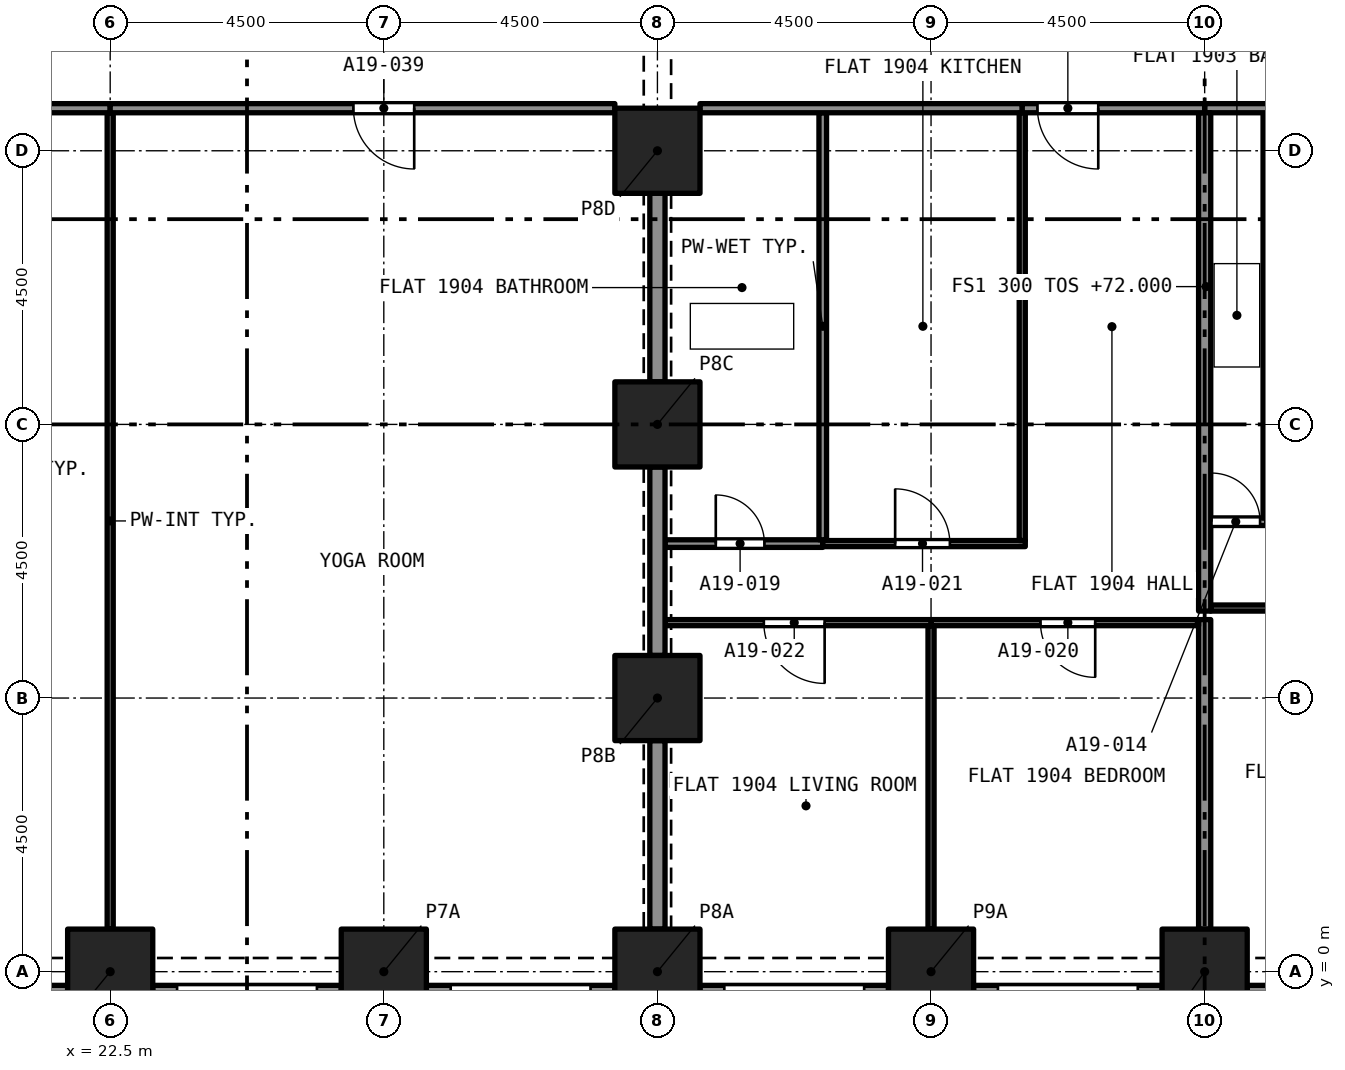
"""IFC4 building model, lengths in metres.
Left out: names, types, materials, properties, quantities, classifications, styles, units other than length and angle.
Written with IfcOpenShell. Run it as: python <this file> out.ifc"""

import sys

from ifc_helpers import new_model, si_unit, direction, frame, frame_2d, origin, origin_2d, place, context, subcontext, project, spatial, rectangle, extrude, element, fill, save


model = new_model("IFC4")
c1 = context("Model", 3, precision=1e-05, world=origin(), true_north=direction((0.0, 1.0)))
c2 = subcontext(c1, "Body", "Model", "MODEL_VIEW")
j1 = project(units=[si_unit("LENGTHUNIT", "METRE"), si_unit("PLANEANGLEUNIT", "RADIAN")], contexts=[c1])
p1 = place(None, origin())
s1 = spatial("IfcSite", under=j1, at=p1, CompositionType="ELEMENT")
p2 = place(p1, origin())
s2 = spatial("IfcBuilding", under=s1, at=p2, CompositionType="ELEMENT")
p3 = place(p2, frame((0.0, 0.0, 72.0)))
s3 = spatial("IfcBuildingStorey", under=s2, at=p3, CompositionType="ELEMENT", Elevation=72.0)
for number, where, z_axis, x_axis in (
    (1, (22.5, 0.0, 0.0), (0.0, 0.0, 1.0), (1.0, 0.0, 0.0)),
    (2, (27.0, 0.0, 0.0), (0.0, 0.0, 1.0), (1.0, 0.0, 0.0)),
    (3, (31.5, 0.0, 0.0), (0.0, 0.0, 1.0), (1.0, 0.0, 0.0)),
    (4, (36.0, 0.0, 0.0), (0.0, 0.0, 1.0), (1.0, 0.0, 0.0)),
    (5, (40.5, 0.0, 0.0), (0.0, 0.0, 1.0), (1.0, 0.0, 0.0)),
    (6, (31.5, 4.5, 0.0), (0.0, 0.0, 1.0), (1.0, 0.0, 0.0)),
    (7, (31.5, 9.0, 0.0), (0.0, 0.0, 1.0), (1.0, 0.0, 0.0)),
    (8, (31.5, 13.5, 0.0), (0.0, 0.0, 1.0), (1.0, 0.0, 0.0)),
):
    element("IfcColumn", number, at=place(p3, frame(where, z_axis=z_axis, x_axis=x_axis)), inside=s3, PredefinedType="COLUMN", context=c2, shape_type="SweptSolid", body=[
        extrude(rectangle(XDim=1.4, YDim=1.4, at=origin_2d()), origin(), (0.0, 0.0, 1.0), 3.2),
    ])
p4 = place(p3, frame((21.8, -0.375, 0.0), z_axis=(0.0, 0.0, 1.0), x_axis=(-1.0, 0.0, 0.0)))
e9 = element("IfcWall", 9, at=p4, inside=s3, PredefinedType="SOLIDWALL", context=c2, shape_type="SweptSolid", body=[
    extrude(rectangle(XDim=3.1, YDim=0.3, at=frame_2d((1.55, 0.0))), origin(), (0.0, 0.0, 1.0), 3.2),
])
p5 = place(p4, frame((0.4, 0.0, 0.45)))
e10 = element("IfcOpeningElement", 10, at=p5, cuts=e9, PredefinedType="OPENING", context=c2, shape_type="SweptSolid", body=[
    extrude(rectangle(XDim=2.3, YDim=1.95, at=frame_2d((1.15, 0.975))), frame((0.0, 0.16, 0.0), z_axis=(0.0, -1.0, 0.0), x_axis=(1.0, 0.0, 0.0)), (0.0, 0.0, 1.0), 0.32),
])
p6 = place(p3, frame((26.3, -0.375, 0.0), z_axis=(0.0, 0.0, 1.0), x_axis=(-1.0, 0.0, 0.0)))
e11 = element("IfcWall", 11, at=p6, inside=s3, PredefinedType="SOLIDWALL", context=c2, shape_type="SweptSolid", body=[
    extrude(rectangle(XDim=3.1, YDim=0.3, at=frame_2d((1.55, 0.0))), origin(), (0.0, 0.0, 1.0), 3.2),
])
p7 = place(p6, frame((0.4, 0.0, 0.45)))
e12 = element("IfcOpeningElement", 12, at=p7, cuts=e11, PredefinedType="OPENING", context=c2, shape_type="SweptSolid", body=[
    extrude(rectangle(XDim=2.3, YDim=1.95, at=frame_2d((1.15, 0.975))), frame((0.0, 0.16, 0.0), z_axis=(0.0, -1.0, 0.0), x_axis=(1.0, 0.0, 0.0)), (0.0, 0.0, 1.0), 0.32),
])
p8 = place(p3, frame((30.8, -0.375, 0.0), z_axis=(0.0, 0.0, 1.0), x_axis=(-1.0, 0.0, 0.0)))
e13 = element("IfcWall", 13, at=p8, inside=s3, PredefinedType="SOLIDWALL", context=c2, shape_type="SweptSolid", body=[
    extrude(rectangle(XDim=3.1, YDim=0.3, at=frame_2d((1.55, 0.0))), origin(), (0.0, 0.0, 1.0), 3.2),
])
p9 = place(p8, frame((0.4, 0.0, 0.45)))
e14 = element("IfcOpeningElement", 14, at=p9, cuts=e13, PredefinedType="OPENING", context=c2, shape_type="SweptSolid", body=[
    extrude(rectangle(XDim=2.3, YDim=1.95, at=frame_2d((1.15, 0.975))), frame((0.0, 0.16, 0.0), z_axis=(0.0, -1.0, 0.0), x_axis=(1.0, 0.0, 0.0)), (0.0, 0.0, 1.0), 0.32),
])
p10 = place(p3, frame((35.3, -0.375, 0.0), z_axis=(0.0, 0.0, 1.0), x_axis=(-1.0, 0.0, 0.0)))
e15 = element("IfcWall", 15, at=p10, inside=s3, PredefinedType="SOLIDWALL", context=c2, shape_type="SweptSolid", body=[
    extrude(rectangle(XDim=3.1, YDim=0.3, at=frame_2d((1.55, 0.0))), origin(), (0.0, 0.0, 1.0), 3.2),
])
p11 = place(p10, frame((0.4, 0.0, 0.45)))
e16 = element("IfcOpeningElement", 16, at=p11, cuts=e15, PredefinedType="OPENING", context=c2, shape_type="SweptSolid", body=[
    extrude(rectangle(XDim=2.3, YDim=1.95, at=frame_2d((1.15, 0.975))), frame((0.0, 0.16, 0.0), z_axis=(0.0, -1.0, 0.0), x_axis=(1.0, 0.0, 0.0)), (0.0, 0.0, 1.0), 0.32),
])
p12 = place(p3, frame((39.8, -0.375, 0.0), z_axis=(0.0, 0.0, 1.0), x_axis=(-1.0, 0.0, 0.0)))
e17 = element("IfcWall", 17, at=p12, inside=s3, PredefinedType="SOLIDWALL", context=c2, shape_type="SweptSolid", body=[
    extrude(rectangle(XDim=3.1, YDim=0.3, at=frame_2d((1.55, 0.0))), origin(), (0.0, 0.0, 1.0), 3.2),
])
p13 = place(p12, frame((0.4, 0.0, 0.45)))
e18 = element("IfcOpeningElement", 18, at=p13, cuts=e17, PredefinedType="OPENING", context=c2, shape_type="SweptSolid", body=[
    extrude(rectangle(XDim=2.3, YDim=1.95, at=frame_2d((1.15, 0.975))), frame((0.0, 0.16, 0.0), z_axis=(0.0, -1.0, 0.0), x_axis=(1.0, 0.0, 0.0)), (0.0, 0.0, 1.0), 0.32),
])
p14 = place(p3, frame((44.3, -0.375, 0.0), z_axis=(0.0, 0.0, 1.0), x_axis=(-1.0, 0.0, 0.0)))
e19 = element("IfcWall", 19, at=p14, inside=s3, PredefinedType="SOLIDWALL", context=c2, shape_type="SweptSolid", body=[
    extrude(rectangle(XDim=3.1, YDim=0.3, at=frame_2d((1.55, 0.0))), origin(), (0.0, 0.0, 1.0), 3.2),
])
p15 = place(p14, frame((0.4, 0.0, 0.45)))
e20 = element("IfcOpeningElement", 20, at=p15, cuts=e19, PredefinedType="OPENING", context=c2, shape_type="SweptSolid", body=[
    extrude(rectangle(XDim=2.3, YDim=1.95, at=frame_2d((1.15, 0.975))), frame((0.0, 0.16, 0.0), z_axis=(0.0, -1.0, 0.0), x_axis=(1.0, 0.0, 0.0)), (0.0, 0.0, 1.0), 0.32),
])
p16 = place(p3, frame((40.6, 7.4, 0.0), z_axis=(0.0, 0.0, 1.0), x_axis=(1.0, 0.0, 0.0)))
e21 = element("IfcWall", 21, at=p16, inside=s3, PredefinedType="PARTITIONING", context=c2, shape_type="SweptSolid", body=[
    extrude(rectangle(XDim=0.923, YDim=0.125, at=frame_2d((0.461, 0.0))), origin(), (0.0, 0.0, 1.0), 2.7),
])
p17 = place(p16, frame((0.011, 0.0, 0.0)))
e22 = element("IfcOpeningElement", 22, at=p17, cuts=e21, PredefinedType="OPENING", context=c2, shape_type="SweptSolid", body=[
    extrude(rectangle(XDim=0.8, YDim=2.1, at=frame_2d((0.4, 1.05))), frame((0.0, 0.073, 0.0), z_axis=(0.0, -1.0, 0.0), x_axis=(1.0, 0.0, 0.0)), (0.0, 0.0, 1.0), 0.145),
])
p18 = place(p3, frame((41.523, 7.462, 0.0), z_axis=(0.0, 0.0, 1.0), x_axis=(0.0, 1.0, 0.0)))
e23 = element("IfcWall", 23, at=p18, inside=s3, PredefinedType="PARTITIONING", context=c2, shape_type="SweptSolid", body=[
    extrude(rectangle(XDim=6.663, YDim=0.125, at=frame_2d((3.331, 0.0))), origin(), (0.0, 0.0, 1.0), 2.7),
])
p19 = place(p3, frame((40.5, 14.2, 0.0), z_axis=(0.0, 0.0, 1.0), x_axis=(1.0, 0.0, 0.0)))
e24 = element("IfcWall", 24, at=p19, inside=s3, PredefinedType="PARTITIONING", context=c2, shape_type="SweptSolid", body=[
    extrude(rectangle(XDim=2.25, YDim=0.15, at=frame_2d((1.125, 0.0))), origin(), (0.0, 0.0, 1.0), 2.7),
])
p20 = place(p3, frame((44.95, 5.98, 0.0), z_axis=(0.0, 0.0, 1.0), x_axis=(-1.0, 0.0, 0.0)))
e25 = element("IfcWall", 25, at=p20, inside=s3, PredefinedType="PARTITIONING", context=c2, shape_type="SweptSolid", body=[
    extrude(rectangle(XDim=4.35, YDim=0.1, at=frame_2d((2.175, 0.0))), origin(), (0.0, 0.0, 1.0), 2.7),
])
p21 = place(p20, frame((1.75, 0.0, 0.0)))
e26 = element("IfcOpeningElement", 26, at=p21, cuts=e25, PredefinedType="OPENING", context=c2, shape_type="SweptSolid", body=[
    extrude(rectangle(XDim=0.9, YDim=2.1, at=frame_2d((0.45, 1.05))), frame((0.0, 0.06, 0.0), z_axis=(0.0, -1.0, 0.0), x_axis=(1.0, 0.0, 0.0)), (0.0, 0.0, 1.0), 0.12),
])
p22 = place(p3, frame((40.5, 0.7, 0.0), z_axis=(0.0, 0.0, 1.0), x_axis=(0.0, 1.0, 0.0)))
e27 = element("IfcWall", 27, at=p22, inside=s3, PredefinedType="PARTITIONING", context=c2, shape_type="SweptSolid", body=[
    extrude(rectangle(XDim=5.09, YDim=0.2, at=frame_2d((2.545, 0.0))), origin(), (0.0, 0.0, 1.0), 2.7),
])
p23 = place(p3, frame((40.5, 5.93, 0.0), z_axis=(0.0, 0.0, 1.0), x_axis=(0.0, 1.0, 0.0)))
e28 = element("IfcWall", 28, at=p23, inside=s3, PredefinedType="PARTITIONING", context=c2, shape_type="SweptSolid", body=[
    extrude(rectangle(XDim=8.195, YDim=0.2, at=frame_2d((4.098, 0.0))), origin(), (0.0, 0.0, 1.0), 2.7),
])
p24 = place(p3, frame((31.625, 7.04, 0.0), z_axis=(0.0, 0.0, 1.0), x_axis=(1.0, 0.0, 0.0)))
e29 = element("IfcWall", 29, at=p24, inside=s3, PredefinedType="PARTITIONING", context=c2, shape_type="SweptSolid", body=[
    extrude(rectangle(XDim=2.594, YDim=0.125, at=frame_2d((1.297, 0.0))), origin(), (0.0, 0.0, 1.0), 2.7),
])
p25 = place(p24, frame((0.835, 0.0, 0.0)))
e30 = element("IfcOpeningElement", 30, at=p25, cuts=e29, PredefinedType="OPENING", context=c2, shape_type="SweptSolid", body=[
    extrude(rectangle(XDim=0.8, YDim=2.1, at=frame_2d((0.4, 1.05))), frame((0.0, 0.073, 0.0), z_axis=(0.0, -1.0, 0.0), x_axis=(1.0, 0.0, 0.0)), (0.0, 0.0, 1.0), 0.145),
])
p26 = place(p3, frame((34.219, 7.103, 0.0), z_axis=(0.0, 0.0, 1.0), x_axis=(0.0, 1.0, 0.0)))
e31 = element("IfcWall", 31, at=p26, inside=s3, PredefinedType="PARTITIONING", context=c2, shape_type="SweptSolid", body=[
    extrude(rectangle(XDim=7.022, YDim=0.125, at=frame_2d((3.511, 0.0))), origin(), (0.0, 0.0, 1.0), 2.7),
])
p27 = place(p3, frame((31.5, 9.7, 0.0), z_axis=(0.0, 0.0, 1.0), x_axis=(0.0, 1.0, 0.0)))
e32 = element("IfcWall", 32, at=p27, inside=s3, PredefinedType="PARTITIONING", context=c2, shape_type="SweptSolid", body=[
    extrude(rectangle(XDim=3.1, YDim=0.25, at=frame_2d((1.55, 0.0))), origin(), (0.0, 0.0, 1.0), 2.38),
])
p28 = place(p3, frame((32.2, 14.2, 0.0), z_axis=(0.0, 0.0, 1.0), x_axis=(1.0, 0.0, 0.0)))
e33 = element("IfcWall", 33, at=p28, inside=s3, PredefinedType="PARTITIONING", context=c2, shape_type="SweptSolid", body=[
    extrude(rectangle(XDim=5.3, YDim=0.15, at=frame_2d((2.65, 0.0))), origin(), (0.0, 0.0, 1.0), 2.7),
])
p29 = place(p3, frame((40.4, 5.74, 0.0), z_axis=(0.0, 0.0, 1.0), x_axis=(-1.0, 0.0, 0.0)))
e34 = element("IfcWall", 34, at=p29, inside=s3, PredefinedType="PARTITIONING", context=c2, shape_type="SweptSolid", body=[
    extrude(rectangle(XDim=4.4, YDim=0.1, at=frame_2d((2.2, 0.0))), origin(), (0.0, 0.0, 1.0), 2.7),
])
p30 = place(p29, frame((1.7, 0.0, 0.0)))
e35 = element("IfcOpeningElement", 35, at=p30, cuts=e34, PredefinedType="OPENING", context=c2, shape_type="SweptSolid", body=[
    extrude(rectangle(XDim=0.9, YDim=2.1, at=frame_2d((0.45, 1.05))), frame((0.0, 0.06, 0.0), z_axis=(0.0, -1.0, 0.0), x_axis=(1.0, 0.0, 0.0)), (0.0, 0.0, 1.0), 0.12),
])
p31 = place(p3, frame((36.0, 0.7, 0.0), z_axis=(0.0, 0.0, 1.0), x_axis=(0.0, 1.0, 0.0)))
e36 = element("IfcWall", 36, at=p31, inside=s3, PredefinedType="PARTITIONING", context=c2, shape_type="SweptSolid", body=[
    extrude(rectangle(XDim=4.99, YDim=0.1, at=frame_2d((2.495, 0.0))), origin(), (0.0, 0.0, 1.0), 2.7),
])
p32 = place(p3, frame((34.219, 7.04, 0.0), z_axis=(0.0, 0.0, 1.0), x_axis=(1.0, 0.0, 0.0)))
e37 = element("IfcWall", 37, at=p32, inside=s3, PredefinedType="PARTITIONING", context=c2, shape_type="SweptSolid", body=[
    extrude(rectangle(XDim=3.331, YDim=0.1, at=frame_2d((1.666, 0.0))), origin(), (0.0, 0.0, 1.0), 2.7),
])
p33 = place(p32, frame((1.19, 0.0, 0.0)))
e38 = element("IfcOpeningElement", 38, at=p33, cuts=e37, PredefinedType="OPENING", context=c2, shape_type="SweptSolid", body=[
    extrude(rectangle(XDim=0.9, YDim=2.1, at=frame_2d((0.45, 1.05))), frame((0.0, 0.06, 0.0), z_axis=(0.0, -1.0, 0.0), x_axis=(1.0, 0.0, 0.0)), (0.0, 0.0, 1.0), 0.12),
])
p34 = place(p3, frame((37.5, 7.09, 0.0), z_axis=(0.0, 0.0, 1.0), x_axis=(0.0, 1.0, 0.0)))
e39 = element("IfcWall", 39, at=p34, inside=s3, PredefinedType="PARTITIONING", context=c2, shape_type="SweptSolid", body=[
    extrude(rectangle(XDim=7.035, YDim=0.1, at=frame_2d((3.518, 0.0))), origin(), (0.0, 0.0, 1.0), 2.7),
])
p35 = place(p3, frame((36.0, 5.74, 0.0), z_axis=(0.0, 0.0, 1.0), x_axis=(-1.0, 0.0, 0.0)))
e40 = element("IfcWall", 40, at=p35, inside=s3, PredefinedType="PARTITIONING", context=c2, shape_type="SweptSolid", body=[
    extrude(rectangle(XDim=4.375, YDim=0.1, at=frame_2d((2.188, 0.0))), origin(), (0.0, 0.0, 1.0), 2.7),
])
p36 = place(p35, frame((1.75, 0.0, 0.0)))
e41 = element("IfcOpeningElement", 41, at=p36, cuts=e40, PredefinedType="OPENING", context=c2, shape_type="SweptSolid", body=[
    extrude(rectangle(XDim=1.0, YDim=2.1, at=frame_2d((0.5, 1.05))), frame((0.0, 0.06, 0.0), z_axis=(0.0, -1.0, 0.0), x_axis=(1.0, 0.0, 0.0)), (0.0, 0.0, 1.0), 0.12),
])
p37 = place(p3, frame((40.5, 14.2, 0.0), z_axis=(0.0, 0.0, 1.0), x_axis=(-1.0, 0.0, 0.0)))
e42 = element("IfcWall", 42, at=p37, inside=s3, PredefinedType="PARTITIONING", context=c2, shape_type="SweptSolid", body=[
    extrude(rectangle(XDim=3.0, YDim=0.15, at=frame_2d((1.5, 0.0))), origin(), (0.0, 0.0, 1.0), 2.7),
])
p38 = place(p37, frame((1.75, 0.0, 0.0)))
e43 = element("IfcOpeningElement", 43, at=p38, cuts=e42, PredefinedType="OPENING", context=c2, shape_type="SweptSolid", body=[
    extrude(rectangle(XDim=1.0, YDim=2.1, at=frame_2d((0.5, 1.05))), frame((0.0, 0.085, 0.0), z_axis=(0.0, -1.0, 0.0), x_axis=(1.0, 0.0, 0.0)), (0.0, 0.0, 1.0), 0.17),
])
for number, where, z_axis, x_axis in (
    (44, (31.5, 0.7, 0.0), (0.0, 0.0, 1.0), (0.0, 1.0, 0.0)),
    (45, (31.5, 5.2, 0.0), (0.0, 0.0, 1.0), (0.0, 1.0, 0.0)),
):
    element("IfcWall", number, at=place(p3, frame(where, z_axis=z_axis, x_axis=x_axis)), inside=s3, PredefinedType="PARTITIONING", context=c2, shape_type="SweptSolid", body=[
        extrude(rectangle(XDim=3.1, YDim=0.25, at=frame_2d((1.55, 0.0))), origin(), (0.0, 0.0, 1.0), 2.38),
    ])
p39 = place(p3, frame((22.5, 0.7, 0.0), z_axis=(0.0, 0.0, 1.0), x_axis=(0.0, 1.0, 0.0)))
e46 = element("IfcWall", 46, at=p39, inside=s3, PredefinedType="PARTITIONING", context=c2, shape_type="SweptSolid", body=[
    extrude(rectangle(XDim=13.425, YDim=0.1, at=frame_2d((6.712, 0.0))), origin(), (0.0, 0.0, 1.0), 2.7),
])
p40 = place(p3, frame((22.5, 14.2, 0.0), z_axis=(0.0, 0.0, 1.0), x_axis=(-1.0, 0.0, 0.0)))
e47 = element("IfcWall", 47, at=p40, inside=s3, PredefinedType="PARTITIONING", context=c2, shape_type="SweptSolid", body=[
    extrude(rectangle(XDim=3.8, YDim=0.15, at=frame_2d((1.9, 0.0))), origin(), (0.0, 0.0, 1.0), 2.7),
])
p41 = place(p40, frame((1.75, 0.0, 0.0)))
e48 = element("IfcOpeningElement", 48, at=p41, cuts=e47, PredefinedType="OPENING", context=c2, shape_type="SweptSolid", body=[
    extrude(rectangle(XDim=1.0, YDim=2.1, at=frame_2d((0.5, 1.05))), frame((0.0, 0.085, 0.0), z_axis=(0.0, -1.0, 0.0), x_axis=(1.0, 0.0, 0.0)), (0.0, 0.0, 1.0), 0.17),
])
p42 = place(p3, frame((30.8, 14.2, 0.0), z_axis=(0.0, 0.0, 1.0), x_axis=(-1.0, 0.0, 0.0)))
e49 = element("IfcWall", 49, at=p42, inside=s3, PredefinedType="PARTITIONING", context=c2, shape_type="SweptSolid", body=[
    extrude(rectangle(XDim=8.3, YDim=0.15, at=frame_2d((4.15, 0.0))), origin(), (0.0, 0.0, 1.0), 2.7),
])
p43 = place(p42, frame((3.3, 0.0, 0.0)))
e50 = element("IfcOpeningElement", 50, at=p43, cuts=e49, PredefinedType="OPENING", context=c2, shape_type="SweptSolid", body=[
    extrude(rectangle(XDim=1.0, YDim=2.1, at=frame_2d((0.5, 1.05))), frame((0.0, 0.085, 0.0), z_axis=(0.0, -1.0, 0.0), x_axis=(1.0, 0.0, 0.0)), (0.0, 0.0, 1.0), 0.17),
])
p44 = place(p17, origin())
e51 = element("IfcDoor", 51, at=p44, inside=s3, OperationType="SINGLE_SWING_LEFT", PredefinedType="DOOR", context=c2, shape_type="SweptSolid", body=[
    extrude(rectangle(XDim=0.8, YDim=2.1, at=frame_2d((0.4, 1.05))), frame((0.0, 0.025, 0.0), z_axis=(0.0, -1.0, 0.0), x_axis=(1.0, 0.0, 0.0)), (0.0, 0.0, 1.0), 0.05),
])
fill(e22, e51)
p45 = place(p25, origin())
e52 = element("IfcDoor", 52, at=p45, inside=s3, OperationType="SINGLE_SWING_LEFT", PredefinedType="DOOR", context=c2, shape_type="SweptSolid", body=[
    extrude(rectangle(XDim=0.8, YDim=2.1, at=frame_2d((0.4, 1.05))), frame((0.0, 0.025, 0.0), z_axis=(0.0, -1.0, 0.0), x_axis=(1.0, 0.0, 0.0)), (0.0, 0.0, 1.0), 0.05),
])
fill(e30, e52)
p46 = place(p30, origin())
e53 = element("IfcDoor", 53, at=p46, inside=s3, OperationType="SINGLE_SWING_LEFT", PredefinedType="DOOR", context=c2, shape_type="SweptSolid", body=[
    extrude(rectangle(XDim=0.9, YDim=2.1, at=frame_2d((0.45, 1.05))), frame((0.0, 0.025, 0.0), z_axis=(0.0, -1.0, 0.0), x_axis=(1.0, 0.0, 0.0)), (0.0, 0.0, 1.0), 0.05),
])
fill(e35, e53)
p47 = place(p33, origin())
e54 = element("IfcDoor", 54, at=p47, inside=s3, OperationType="SINGLE_SWING_LEFT", PredefinedType="DOOR", context=c2, shape_type="SweptSolid", body=[
    extrude(rectangle(XDim=0.9, YDim=2.1, at=frame_2d((0.45, 1.05))), frame((0.0, 0.025, 0.0), z_axis=(0.0, -1.0, 0.0), x_axis=(1.0, 0.0, 0.0)), (0.0, 0.0, 1.0), 0.05),
])
fill(e38, e54)
p48 = place(p36, origin())
e55 = element("IfcDoor", 55, at=p48, inside=s3, OperationType="SINGLE_SWING_RIGHT", PredefinedType="DOOR", context=c2, shape_type="SweptSolid", body=[
    extrude(rectangle(XDim=1.0, YDim=2.1, at=frame_2d((0.5, 1.05))), frame((0.0, 0.025, 0.0), z_axis=(0.0, -1.0, 0.0), x_axis=(1.0, 0.0, 0.0)), (0.0, 0.0, 1.0), 0.05),
])
fill(e41, e55)
p49 = place(p38, origin())
e56 = element("IfcDoor", 56, at=p49, inside=s3, OperationType="SINGLE_SWING_RIGHT", PredefinedType="DOOR", context=c2, shape_type="SweptSolid", body=[
    extrude(rectangle(XDim=1.0, YDim=2.1, at=frame_2d((0.5, 1.05))), frame((0.0, 0.025, 0.0), z_axis=(0.0, -1.0, 0.0), x_axis=(1.0, 0.0, 0.0)), (0.0, 0.0, 1.0), 0.05),
])
fill(e43, e56)
p50 = place(p43, origin())
e57 = element("IfcDoor", 57, at=p50, inside=s3, OperationType="SINGLE_SWING_LEFT", PredefinedType="DOOR", context=c2, shape_type="SweptSolid", body=[
    extrude(rectangle(XDim=1.0, YDim=2.1, at=frame_2d((0.5, 1.05))), frame((0.0, 0.025, 0.0), z_axis=(0.0, -1.0, 0.0), x_axis=(1.0, 0.0, 0.0)), (0.0, 0.0, 1.0), 0.05),
])
fill(e50, e57)
save(model, sys.argv[1])
